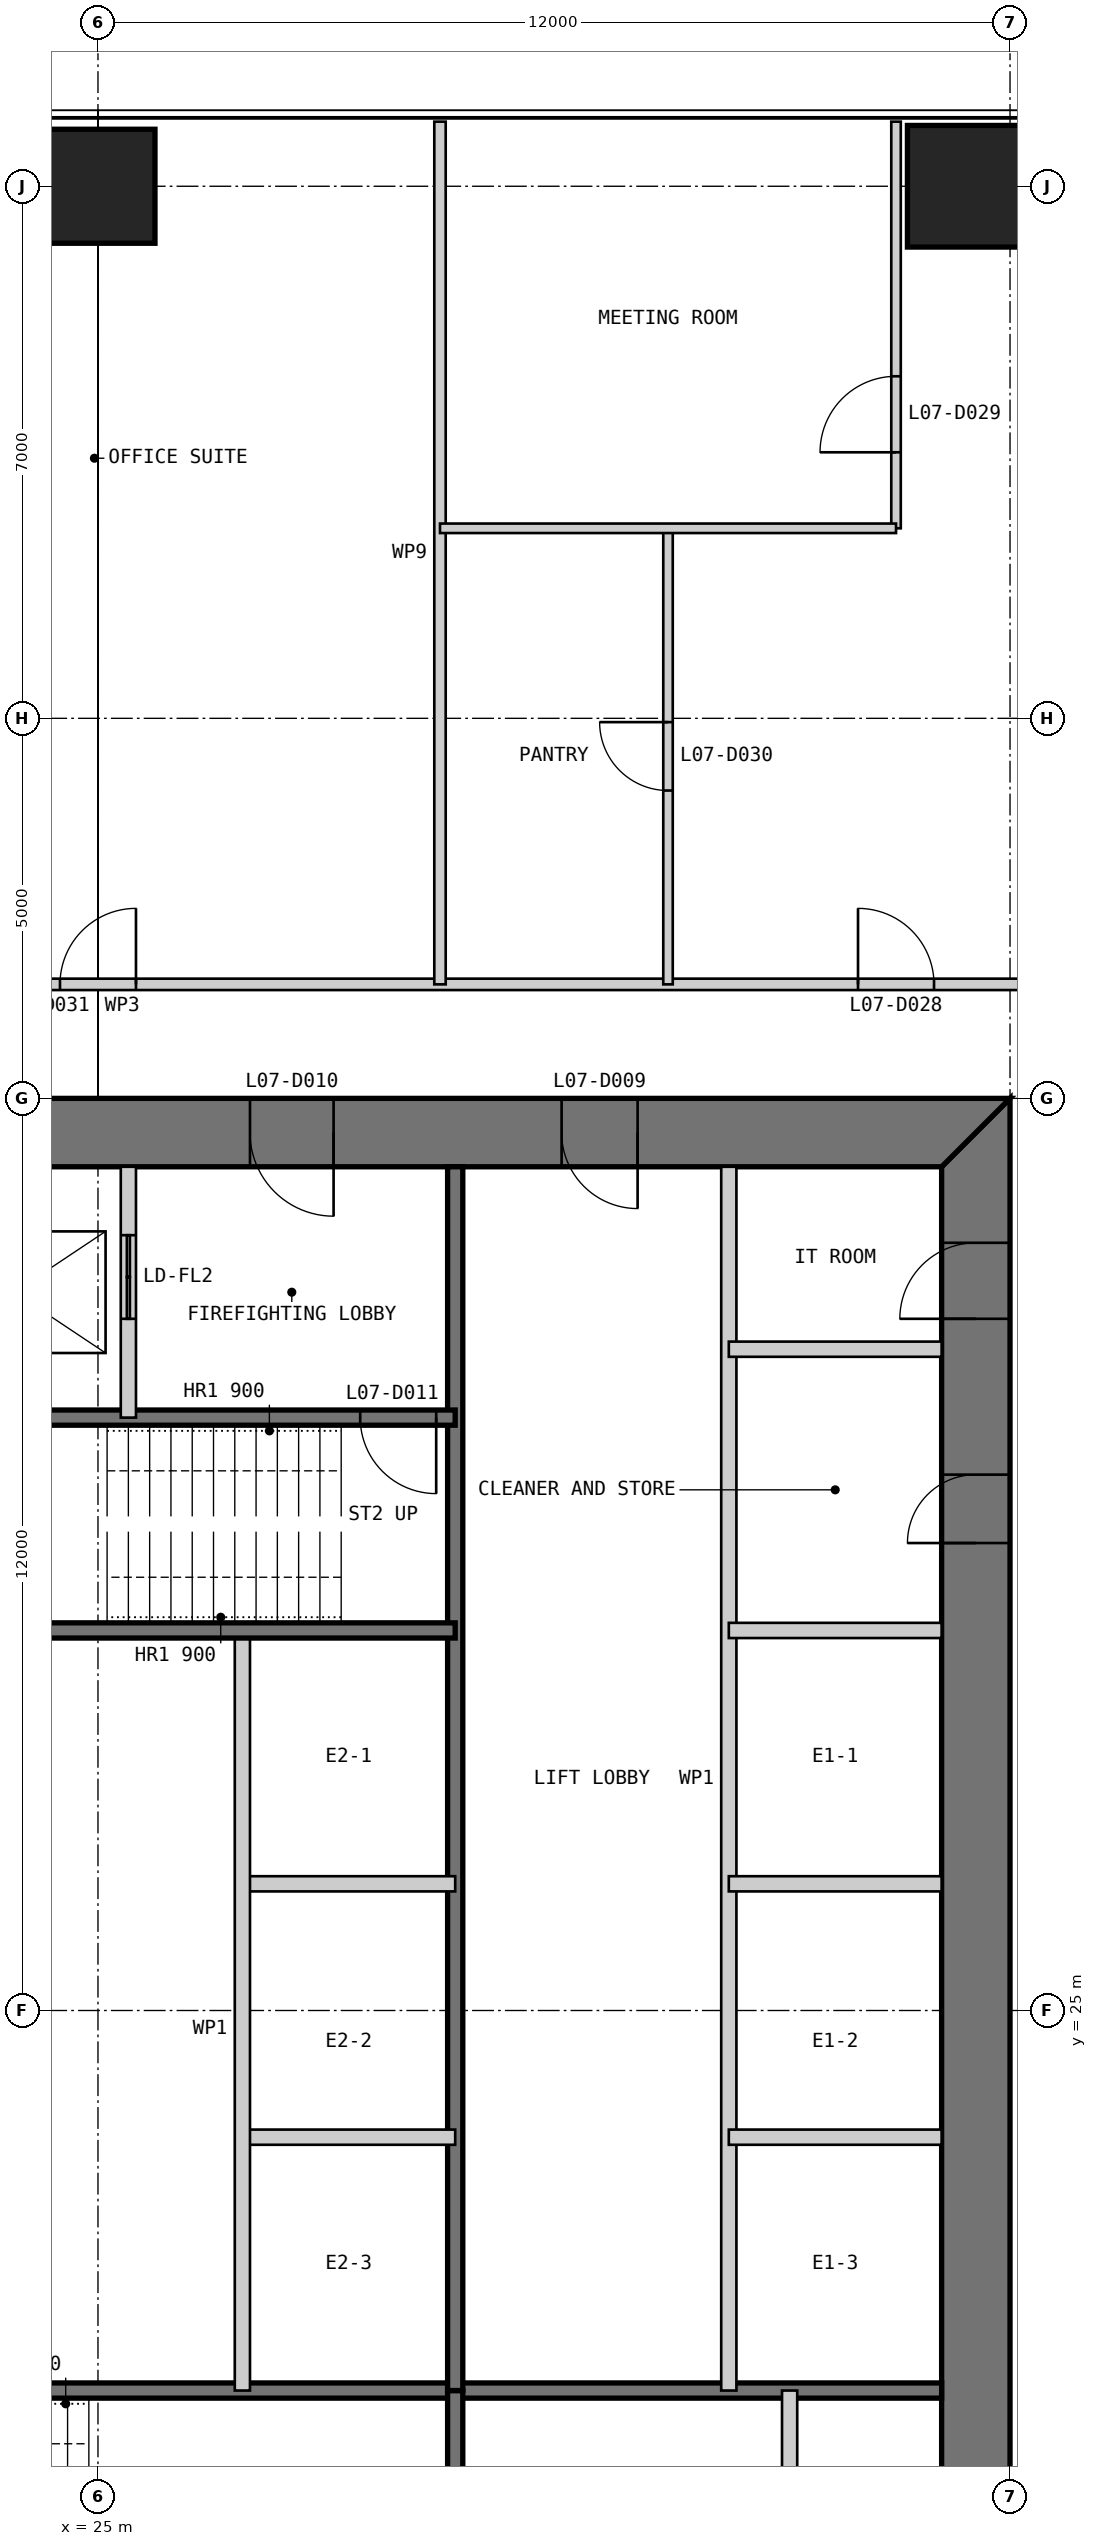
"""IFC4 building model, lengths in metres.
Left out: names, types, materials, properties, quantities, classifications, styles, units other than length and angle.
Written with IfcOpenShell. Run it as: python <this file> out.ifc"""

import sys

from ifc_helpers import new_model, si_unit, direction, frame, frame_2d, origin, origin_2d, place, context, subcontext, project, spatial, polyline, rectangle, outline, extrude, element, fill, save


model = new_model("IFC4")
c1 = context("Model", 3, precision=1e-05, world=origin(), true_north=direction((0.0, 1.0)))
c2 = subcontext(c1, "Body", "Model", "MODEL_VIEW")
j1 = project(units=[si_unit("LENGTHUNIT", "METRE"), si_unit("PLANEANGLEUNIT", "RADIAN")], contexts=[c1])
p1 = place(None, origin())
s1 = spatial("IfcSite", under=j1, at=p1, CompositionType="ELEMENT")
p2 = place(p1, origin())
s2 = spatial("IfcBuilding", under=s1, at=p2, CompositionType="ELEMENT")
p3 = place(p2, frame((0.0, 0.0, 35.0)))
s3 = spatial("IfcBuildingStorey", under=s2, at=p3, CompositionType="ELEMENT", Elevation=35.0)
p4 = place(p3, frame((37.0, 49.0, 0.0), z_axis=(0.0, 0.0, 1.0), x_axis=(1.0, 0.0, 0.0)))
e1 = element("IfcColumn", 1, at=p4, inside=s3, PredefinedType="COLUMN", context=c2, shape_type="SweptSolid", body=[
    extrude(rectangle(XDim=2.7, YDim=1.6, at=origin_2d()), origin(), (0.0, 0.0, 1.0), 4.0),
])
p5 = place(p3, frame((25.0, 49.0, 0.0), z_axis=(0.0, 0.0, 1.0), x_axis=(1.0, 0.0, 0.0)))
e2 = element("IfcColumn", 2, at=p5, inside=s3, PredefinedType="COLUMN", context=c2, shape_type="SweptSolid", body=[
    extrude(rectangle(XDim=1.5, YDim=1.5, at=origin_2d()), origin(), (0.0, 0.0, 1.0), 4.0),
])
p6 = place(p3, frame((36.55, 13.9, 0.0), z_axis=(0.0, 0.0, 1.0), x_axis=(0.0, 1.0, 0.0)))
e3 = element("IfcWall", 3, at=p6, inside=s3, PredefinedType="SHEAR", context=c2, shape_type="SweptSolid", body=[
    extrude(outline(polyline([(-0.9, -0.45), (23.1, -0.45), (22.2, 0.45), (0.0, 0.45), (-0.9, -0.45)])), origin(), (0.0, 0.0, 1.0), 4.0),
])
p7 = place(p6, frame((20.2, 0.0, 0.0)))
e4 = element("IfcOpeningElement", 4, at=p7, cuts=e3, PredefinedType="OPENING", context=c2, shape_type="SweptSolid", body=[
    extrude(rectangle(XDim=1.0, YDim=2.2, at=frame_2d((0.5, 1.1))), frame((0.0, 0.46, 0.0), z_axis=(0.0, -1.0, 0.0), x_axis=(1.0, 0.0, 0.0)), (0.0, 0.0, 1.0), 0.92),
])
p8 = place(p6, frame((17.25, 0.0, 0.0)))
e5 = element("IfcOpeningElement", 5, at=p8, cuts=e3, PredefinedType="OPENING", context=c2, shape_type="SweptSolid", body=[
    extrude(rectangle(XDim=0.9, YDim=2.2, at=frame_2d((0.45, 1.1))), frame((0.0, 0.46, 0.0), z_axis=(0.0, -1.0, 0.0), x_axis=(1.0, 0.0, 0.0)), (0.0, 0.0, 1.0), 0.92),
])
p9 = place(p3, frame((37.0, 36.55, 0.0), z_axis=(0.0, 0.0, 1.0), x_axis=(-1.0, 0.0, 0.0)))
e6 = element("IfcWall", 6, at=p9, inside=s3, PredefinedType="SHEAR", context=c2, shape_type="SweptSolid", body=[
    extrude(outline(polyline([(0.0, -0.45), (24.0, -0.45), (23.1, 0.45), (0.9, 0.45), (0.0, -0.45)])), origin(), (0.0, 0.0, 1.0), 4.0),
])
p10 = place(p9, frame((4.9, 0.0, 0.0)))
e7 = element("IfcOpeningElement", 7, at=p10, cuts=e6, PredefinedType="OPENING", context=c2, shape_type="SweptSolid", body=[
    extrude(rectangle(XDim=1.0, YDim=2.2, at=frame_2d((0.5, 1.1))), frame((0.0, 0.46, 0.0), z_axis=(0.0, -1.0, 0.0), x_axis=(1.0, 0.0, 0.0)), (0.0, 0.0, 1.0), 0.92),
])
p11 = place(p9, frame((8.9, 0.0, 0.0)))
e8 = element("IfcOpeningElement", 8, at=p11, cuts=e6, PredefinedType="OPENING", context=c2, shape_type="SweptSolid", body=[
    extrude(rectangle(XDim=1.1, YDim=2.2, at=frame_2d((0.55, 1.1))), frame((0.0, 0.46, 0.0), z_axis=(0.0, -1.0, 0.0), x_axis=(1.0, 0.0, 0.0)), (0.0, 0.0, 1.0), 0.92),
])
p12 = place(p9, frame((15.05, 0.0, 0.0)))
e9 = element("IfcOpeningElement", 9, at=p12, cuts=e6, PredefinedType="OPENING", context=c2, shape_type="SweptSolid", body=[
    extrude(rectangle(XDim=0.9, YDim=2.2, at=frame_2d((0.45, 1.1))), frame((0.0, 0.46, 0.0), z_axis=(0.0, -1.0, 0.0), x_axis=(1.0, 0.0, 0.0)), (0.0, 0.0, 1.0), 0.92),
])
p13 = place(p9, frame((17.9, 0.0, 0.0)))
e10 = element("IfcOpeningElement", 10, at=p13, cuts=e6, PredefinedType="OPENING", context=c2, shape_type="SweptSolid", body=[
    extrude(rectangle(XDim=1.0, YDim=2.2, at=frame_2d((0.5, 1.1))), frame((0.0, 0.46, 0.0), z_axis=(0.0, -1.0, 0.0), x_axis=(1.0, 0.0, 0.0)), (0.0, 0.0, 1.0), 0.92),
])
p14 = place(p9, frame((21.4, 0.0, 0.0)))
e11 = element("IfcOpeningElement", 11, at=p14, cuts=e6, PredefinedType="OPENING", context=c2, shape_type="SweptSolid", body=[
    extrude(rectangle(XDim=1.0, YDim=2.2, at=frame_2d((0.5, 1.1))), frame((0.0, 0.46, 0.0), z_axis=(0.0, -1.0, 0.0), x_axis=(1.0, 0.0, 0.0)), (0.0, 0.0, 1.0), 0.92),
])
p15 = place(p3, frame((20.3, 20.0, 0.0), z_axis=(0.0, 0.0, 1.0), x_axis=(1.0, 0.0, 0.0)))
e12 = element("IfcWall", 12, at=p15, inside=s3, PredefinedType="SOLIDWALL", context=c2, shape_type="SweptSolid", body=[
    extrude(rectangle(XDim=15.8, YDim=0.2, at=frame_2d((7.9, 0.0))), origin(), (0.0, 0.0, 1.0), 3.8),
])
p16 = place(p3, frame((29.7, 13.9, 0.0), z_axis=(0.0, 0.0, 1.0), x_axis=(0.0, 1.0, 0.0)))
e13 = element("IfcWall", 13, at=p16, inside=s3, PredefinedType="SOLIDWALL", context=c2, shape_type="SweptSolid", body=[
    extrude(rectangle(XDim=6.1, YDim=0.2, at=frame_2d((3.05, 0.0))), origin(), (0.0, 0.0, 1.0), 3.8),
])
p17 = place(p3, frame((34.1, 13.9, 0.0), z_axis=(0.0, 0.0, 1.0), x_axis=(0.0, 1.0, 0.0)))
e14 = element("IfcWall", 14, at=p17, inside=s3, PredefinedType="PARTITIONING", context=c2, shape_type="SweptSolid", body=[
    extrude(rectangle(XDim=6.1, YDim=0.2, at=frame_2d((3.05, 0.0))), origin(), (0.0, 0.0, 1.0), 3.8),
])
p18 = place(p3, frame((33.3, 36.1, 0.0), z_axis=(0.0, 0.0, 1.0), x_axis=(0.0, -1.0, 0.0)))
e15 = element("IfcWall", 15, at=p18, inside=s3, PredefinedType="PARTITIONING", context=c2, shape_type="SweptSolid", body=[
    extrude(rectangle(XDim=16.1, YDim=0.2, at=frame_2d((8.05, 0.0))), origin(), (0.0, 0.0, 1.0), 3.8),
])
p19 = place(p3, frame((29.7, 36.1, 0.0), z_axis=(0.0, 0.0, 1.0), x_axis=(0.0, -1.0, 0.0)))
e16 = element("IfcWall", 16, at=p19, inside=s3, PredefinedType="SOLIDWALL", context=c2, shape_type="SweptSolid", body=[
    extrude(rectangle(XDim=16.1, YDim=0.2, at=frame_2d((8.05, 0.0))), origin(), (0.0, 0.0, 1.0), 3.8),
])
for number, where, z_axis, x_axis in (
    (17, (36.1, 30.0, 0.0), (0.0, 0.0, 1.0), (-1.0, 0.0, 0.0)),
    (18, (36.1, 26.667, 0.0), (0.0, 0.0, 1.0), (-1.0, 0.0, 0.0)),
    (19, (36.1, 23.333, 0.0), (0.0, 0.0, 1.0), (-1.0, 0.0, 0.0)),
    (20, (29.7, 26.667, 0.0), (0.0, 0.0, 1.0), (-1.0, 0.0, 0.0)),
    (21, (29.7, 23.333, 0.0), (0.0, 0.0, 1.0), (-1.0, 0.0, 0.0)),
):
    element("IfcWall", number, at=place(p3, frame(where, z_axis=z_axis, x_axis=x_axis)), inside=s3, PredefinedType="PARTITIONING", context=c2, shape_type="SweptSolid", body=[
        extrude(rectangle(XDim=2.8, YDim=0.2, at=frame_2d((1.4, 0.0))), origin(), (0.0, 0.0, 1.0), 3.8),
    ])
p20 = place(p3, frame((26.9, 30.0, 0.0), z_axis=(0.0, 0.0, 1.0), x_axis=(0.0, -1.0, 0.0)))
e22 = element("IfcWall", 22, at=p20, inside=s3, PredefinedType="PARTITIONING", context=c2, shape_type="SweptSolid", body=[
    extrude(rectangle(XDim=10.0, YDim=0.2, at=frame_2d((5.0, 0.0))), origin(), (0.0, 0.0, 1.0), 3.8),
])
p21 = place(p3, frame((29.7, 32.8, 0.0), z_axis=(0.0, 0.0, 1.0), x_axis=(-1.0, 0.0, 0.0)))
e23 = element("IfcWall", 23, at=p21, inside=s3, PredefinedType="SOLIDWALL", context=c2, shape_type="SweptSolid", body=[
    extrude(rectangle(XDim=9.4, YDim=0.2, at=frame_2d((4.7, 0.0))), origin(), (0.0, 0.0, 1.0), 3.8),
])
p22 = place(p21, frame((0.25, 0.0, 0.0)))
e24 = element("IfcOpeningElement", 24, at=p22, cuts=e23, PredefinedType="OPENING", context=c2, shape_type="SweptSolid", body=[
    extrude(rectangle(XDim=1.0, YDim=2.2, at=frame_2d((0.5, 1.1))), frame((0.0, 0.11, 0.0), z_axis=(0.0, -1.0, 0.0), x_axis=(1.0, 0.0, 0.0)), (0.0, 0.0, 1.0), 0.22),
])
p23 = place(p3, frame((29.7, 30.0, 0.0), z_axis=(0.0, 0.0, 1.0), x_axis=(-1.0, 0.0, 0.0)))
e25 = element("IfcWall", 25, at=p23, inside=s3, PredefinedType="SOLIDWALL", context=c2, shape_type="SweptSolid", body=[
    extrude(rectangle(XDim=15.8, YDim=0.2, at=frame_2d((7.9, 0.0))), origin(), (0.0, 0.0, 1.0), 3.8),
])
p24 = place(p3, frame((25.4, 36.1, 0.0), z_axis=(0.0, 0.0, 1.0), x_axis=(0.0, -1.0, 0.0)))
e26 = element("IfcWall", 26, at=p24, inside=s3, PredefinedType="PARTITIONING", context=c2, shape_type="SweptSolid", body=[
    extrude(rectangle(XDim=3.3, YDim=0.2, at=frame_2d((1.65, 0.0))), origin(), (0.0, 0.0, 1.0), 3.8),
])
p25 = place(p24, frame((0.9, 0.0, 0.0)))
e27 = element("IfcOpeningElement", 27, at=p25, cuts=e26, PredefinedType="OPENING", context=c2, shape_type="SweptSolid", body=[
    extrude(rectangle(XDim=1.1, YDim=2.2, at=frame_2d((0.55, 1.1))), frame((0.0, 0.11, 0.0), z_axis=(0.0, -1.0, 0.0), x_axis=(1.0, 0.0, 0.0)), (0.0, 0.0, 1.0), 0.22),
])
p26 = place(p3, frame((36.1, 33.7, 0.0), z_axis=(0.0, 0.0, 1.0), x_axis=(-1.0, 0.0, 0.0)))
e28 = element("IfcWall", 28, at=p26, inside=s3, PredefinedType="PARTITIONING", context=c2, shape_type="SweptSolid", body=[
    extrude(rectangle(XDim=2.8, YDim=0.2, at=frame_2d((1.4, 0.0))), origin(), (0.0, 0.0, 1.0), 3.8),
])
p27 = place(p3, frame((38.5, 38.5, 0.0), z_axis=(0.0, 0.0, 1.0), x_axis=(-1.0, 0.0, 0.0)))
e29 = element("IfcWall", 29, at=p27, inside=s3, PredefinedType="PARTITIONING", context=c2, shape_type="SweptSolid", body=[
    extrude(rectangle(XDim=27.0, YDim=0.15, at=frame_2d((13.5, 0.0))), origin(), (0.0, 0.0, 1.0), 3.85),
])
p28 = place(p27, frame((2.5, 0.0, 0.0)))
e30 = element("IfcOpeningElement", 30, at=p28, cuts=e29, PredefinedType="OPENING", context=c2, shape_type="SweptSolid", body=[
    extrude(rectangle(XDim=1.0, YDim=2.2, at=frame_2d((0.5, 1.1))), frame((0.0, 0.085, 0.0), z_axis=(0.0, -1.0, 0.0), x_axis=(1.0, 0.0, 0.0)), (0.0, 0.0, 1.0), 0.17),
])
p29 = place(p27, frame((13.0, 0.0, 0.0)))
e31 = element("IfcOpeningElement", 31, at=p29, cuts=e29, PredefinedType="OPENING", context=c2, shape_type="SweptSolid", body=[
    extrude(rectangle(XDim=1.0, YDim=2.2, at=frame_2d((0.5, 1.1))), frame((0.0, 0.085, 0.0), z_axis=(0.0, -1.0, 0.0), x_axis=(1.0, 0.0, 0.0)), (0.0, 0.0, 1.0), 0.17),
])
p30 = place(p27, frame((23.5, 0.0, 0.0)))
e32 = element("IfcOpeningElement", 32, at=p30, cuts=e29, PredefinedType="OPENING", context=c2, shape_type="SweptSolid", body=[
    extrude(rectangle(XDim=1.0, YDim=2.2, at=frame_2d((0.5, 1.1))), frame((0.0, 0.085, 0.0), z_axis=(0.0, -1.0, 0.0), x_axis=(1.0, 0.0, 0.0)), (0.0, 0.0, 1.0), 0.17),
])
p31 = place(p3, frame((35.5, 49.85, 0.0), z_axis=(0.0, 0.0, 1.0), x_axis=(0.0, -1.0, 0.0)))
e33 = element("IfcWall", 33, at=p31, inside=s3, PredefinedType="PARTITIONING", context=c2, shape_type="SweptSolid", body=[
    extrude(rectangle(XDim=5.35, YDim=0.125, at=frame_2d((2.675, 0.0))), origin(), (0.0, 0.0, 1.0), 3.85),
])
p32 = place(p31, frame((3.35, 0.0, 0.0)))
e34 = element("IfcOpeningElement", 34, at=p32, cuts=e33, PredefinedType="OPENING", context=c2, shape_type="SweptSolid", body=[
    extrude(rectangle(XDim=1.0, YDim=2.2, at=frame_2d((0.5, 1.1))), frame((0.0, 0.073, 0.0), z_axis=(0.0, -1.0, 0.0), x_axis=(1.0, 0.0, 0.0)), (0.0, 0.0, 1.0), 0.145),
])
p33 = place(p3, frame((32.5, 44.5, 0.0), z_axis=(0.0, 0.0, 1.0), x_axis=(0.0, -1.0, 0.0)))
e35 = element("IfcWall", 35, at=p33, inside=s3, PredefinedType="PARTITIONING", context=c2, shape_type="SweptSolid", body=[
    extrude(rectangle(XDim=6.0, YDim=0.125, at=frame_2d((3.0, 0.0))), origin(), (0.0, 0.0, 1.0), 3.85),
])
p34 = place(p33, frame((2.55, 0.0, 0.0)))
e36 = element("IfcOpeningElement", 36, at=p34, cuts=e35, PredefinedType="OPENING", context=c2, shape_type="SweptSolid", body=[
    extrude(rectangle(XDim=0.9, YDim=2.2, at=frame_2d((0.45, 1.1))), frame((0.0, 0.073, 0.0), z_axis=(0.0, -1.0, 0.0), x_axis=(1.0, 0.0, 0.0)), (0.0, 0.0, 1.0), 0.145),
])
p35 = place(p3, frame((29.5, 49.85, 0.0), z_axis=(0.0, 0.0, 1.0), x_axis=(0.0, -1.0, 0.0)))
e37 = element("IfcWall", 37, at=p35, inside=s3, PredefinedType="PARTITIONING", context=c2, shape_type="SweptSolid", body=[
    extrude(rectangle(XDim=11.35, YDim=0.15, at=frame_2d((5.675, 0.0))), origin(), (0.0, 0.0, 1.0), 3.85),
])
p36 = place(p3, frame((35.5, 44.5, 0.0), z_axis=(0.0, 0.0, 1.0), x_axis=(-1.0, 0.0, 0.0)))
e38 = element("IfcWall", 38, at=p36, inside=s3, PredefinedType="PARTITIONING", context=c2, shape_type="SweptSolid", body=[
    extrude(rectangle(XDim=6.0, YDim=0.125, at=frame_2d((3.0, 0.0))), origin(), (0.0, 0.0, 1.0), 3.85),
])
p37 = place(p10, origin())
e39 = element("IfcDoor", 39, at=p37, inside=s3, OperationType="SINGLE_SWING_LEFT", PredefinedType="DOOR", context=c2, shape_type="SweptSolid", body=[
    extrude(rectangle(XDim=1.0, YDim=2.2, at=frame_2d((0.5, 1.1))), frame((0.0, 0.025, 0.0), z_axis=(0.0, -1.0, 0.0), x_axis=(1.0, 0.0, 0.0)), (0.0, 0.0, 1.0), 0.05),
    extrude(outline(polyline([(0.0, 0.0), (0.04, 0.0), (0.04, 2.16), (0.96, 2.16), (0.96, 0.0), (1.0, 0.0), (1.0, 2.2), (0.0, 2.2), (0.0, 0.0)])), frame((0.0, 0.3, 0.0), z_axis=(0.0, -1.0, 0.0), x_axis=(1.0, 0.0, 0.0)), (0.0, 0.0, 1.0), 0.6),
])
fill(e7, e39)
p38 = place(p11, origin())
e40 = element("IfcDoor", 40, at=p38, inside=s3, OperationType="SINGLE_SWING_LEFT", PredefinedType="DOOR", context=c2, shape_type="SweptSolid", body=[
    extrude(rectangle(XDim=1.1, YDim=2.2, at=frame_2d((0.55, 1.1))), frame((0.0, 0.025, 0.0), z_axis=(0.0, -1.0, 0.0), x_axis=(1.0, 0.0, 0.0)), (0.0, 0.0, 1.0), 0.05),
    extrude(outline(polyline([(0.0, 0.0), (0.04, 0.0), (0.04, 2.16), (1.06, 2.16), (1.06, 0.0), (1.1, 0.0), (1.1, 2.2), (0.0, 2.2), (0.0, 0.0)])), frame((0.0, 0.3, 0.0), z_axis=(0.0, -1.0, 0.0), x_axis=(1.0, 0.0, 0.0)), (0.0, 0.0, 1.0), 0.6),
])
fill(e8, e40)
p39 = place(p22, origin())
e41 = element("IfcDoor", 41, at=p39, inside=s3, OperationType="SINGLE_SWING_LEFT", PredefinedType="DOOR", context=c2, shape_type="SweptSolid", body=[
    extrude(rectangle(XDim=1.0, YDim=2.2, at=frame_2d((0.5, 1.1))), frame((0.0, 0.025, 0.0), z_axis=(0.0, -1.0, 0.0), x_axis=(1.0, 0.0, 0.0)), (0.0, 0.0, 1.0), 0.05),
])
fill(e24, e41)
p40 = place(p7, origin())
e42 = element("IfcDoor", 42, at=p40, inside=s3, OperationType="SINGLE_SWING_LEFT", PredefinedType="DOOR", context=c2, shape_type="SweptSolid", body=[
    extrude(rectangle(XDim=1.0, YDim=2.2, at=frame_2d((0.5, 1.1))), frame((0.0, 0.025, 0.0), z_axis=(0.0, -1.0, 0.0), x_axis=(1.0, 0.0, 0.0)), (0.0, 0.0, 1.0), 0.05),
    extrude(outline(polyline([(0.0, 0.0), (0.04, 0.0), (0.04, 2.16), (0.96, 2.16), (0.96, 0.0), (1.0, 0.0), (1.0, 2.2), (0.0, 2.2), (0.0, 0.0)])), frame((0.0, 0.3, 0.0), z_axis=(0.0, -1.0, 0.0), x_axis=(1.0, 0.0, 0.0)), (0.0, 0.0, 1.0), 0.6),
])
fill(e4, e42)
p41 = place(p8, origin())
e43 = element("IfcDoor", 43, at=p41, inside=s3, OperationType="SINGLE_SWING_LEFT", PredefinedType="DOOR", context=c2, shape_type="SweptSolid", body=[
    extrude(rectangle(XDim=0.9, YDim=2.2, at=frame_2d((0.45, 1.1))), frame((0.0, 0.025, 0.0), z_axis=(0.0, -1.0, 0.0), x_axis=(1.0, 0.0, 0.0)), (0.0, 0.0, 1.0), 0.05),
    extrude(outline(polyline([(0.0, 0.0), (0.04, 0.0), (0.04, 2.16), (0.86, 2.16), (0.86, 0.0), (0.9, 0.0), (0.9, 2.2), (0.0, 2.2), (0.0, 0.0)])), frame((0.0, 0.3, 0.0), z_axis=(0.0, -1.0, 0.0), x_axis=(1.0, 0.0, 0.0)), (0.0, 0.0, 1.0), 0.6),
])
fill(e5, e43)
p42 = place(p28, frame((1.0, 0.0, 0.0), z_axis=(0.0, 0.0, 1.0), x_axis=(-1.0, 0.0, 0.0)))
e44 = element("IfcDoor", 44, at=p42, inside=s3, OperationType="SINGLE_SWING_LEFT", PredefinedType="DOOR", context=c2, shape_type="SweptSolid", body=[
    extrude(rectangle(XDim=1.0, YDim=2.2, at=frame_2d((0.5, 1.1))), frame((0.0, 0.025, 0.0), z_axis=(0.0, -1.0, 0.0), x_axis=(1.0, 0.0, 0.0)), (0.0, 0.0, 1.0), 0.05),
])
fill(e30, e44)
p43 = place(p32, frame((1.0, 0.0, 0.0), z_axis=(0.0, 0.0, 1.0), x_axis=(-1.0, 0.0, 0.0)))
e45 = element("IfcDoor", 45, at=p43, inside=s3, OperationType="SINGLE_SWING_LEFT", PredefinedType="DOOR", context=c2, shape_type="SweptSolid", body=[
    extrude(rectangle(XDim=1.0, YDim=2.2, at=frame_2d((0.5, 1.1))), frame((0.0, 0.025, 0.0), z_axis=(0.0, -1.0, 0.0), x_axis=(1.0, 0.0, 0.0)), (0.0, 0.0, 1.0), 0.05),
])
fill(e34, e45)
p44 = place(p34, frame((0.9, 0.0, 0.0), z_axis=(0.0, 0.0, 1.0), x_axis=(-1.0, 0.0, 0.0)))
e46 = element("IfcDoor", 46, at=p44, inside=s3, OperationType="SINGLE_SWING_RIGHT", PredefinedType="DOOR", context=c2, shape_type="SweptSolid", body=[
    extrude(rectangle(XDim=0.9, YDim=2.2, at=frame_2d((0.45, 1.1))), frame((0.0, 0.025, 0.0), z_axis=(0.0, -1.0, 0.0), x_axis=(1.0, 0.0, 0.0)), (0.0, 0.0, 1.0), 0.05),
])
fill(e36, e46)
p45 = place(p29, frame((1.0, 0.0, 0.0), z_axis=(0.0, 0.0, 1.0), x_axis=(-1.0, 0.0, 0.0)))
e47 = element("IfcDoor", 47, at=p45, inside=s3, OperationType="SINGLE_SWING_RIGHT", PredefinedType="DOOR", context=c2, shape_type="SweptSolid", body=[
    extrude(rectangle(XDim=1.0, YDim=2.2, at=frame_2d((0.5, 1.1))), frame((0.0, 0.025, 0.0), z_axis=(0.0, -1.0, 0.0), x_axis=(1.0, 0.0, 0.0)), (0.0, 0.0, 1.0), 0.05),
])
fill(e31, e47)
p46 = place(p25, origin())
e48 = element("IfcDoor", 48, at=p46, inside=s3, OperationType="DOUBLE_DOOR_SLIDING", PredefinedType="DOOR", context=c2, shape_type="SweptSolid", body=[
    extrude(rectangle(XDim=1.1, YDim=2.2, at=frame_2d((0.55, 1.1))), frame((0.0, 0.025, 0.0), z_axis=(0.0, -1.0, 0.0), x_axis=(1.0, 0.0, 0.0)), (0.0, 0.0, 1.0), 0.05),
])
fill(e27, e48)
save(model, sys.argv[1])
